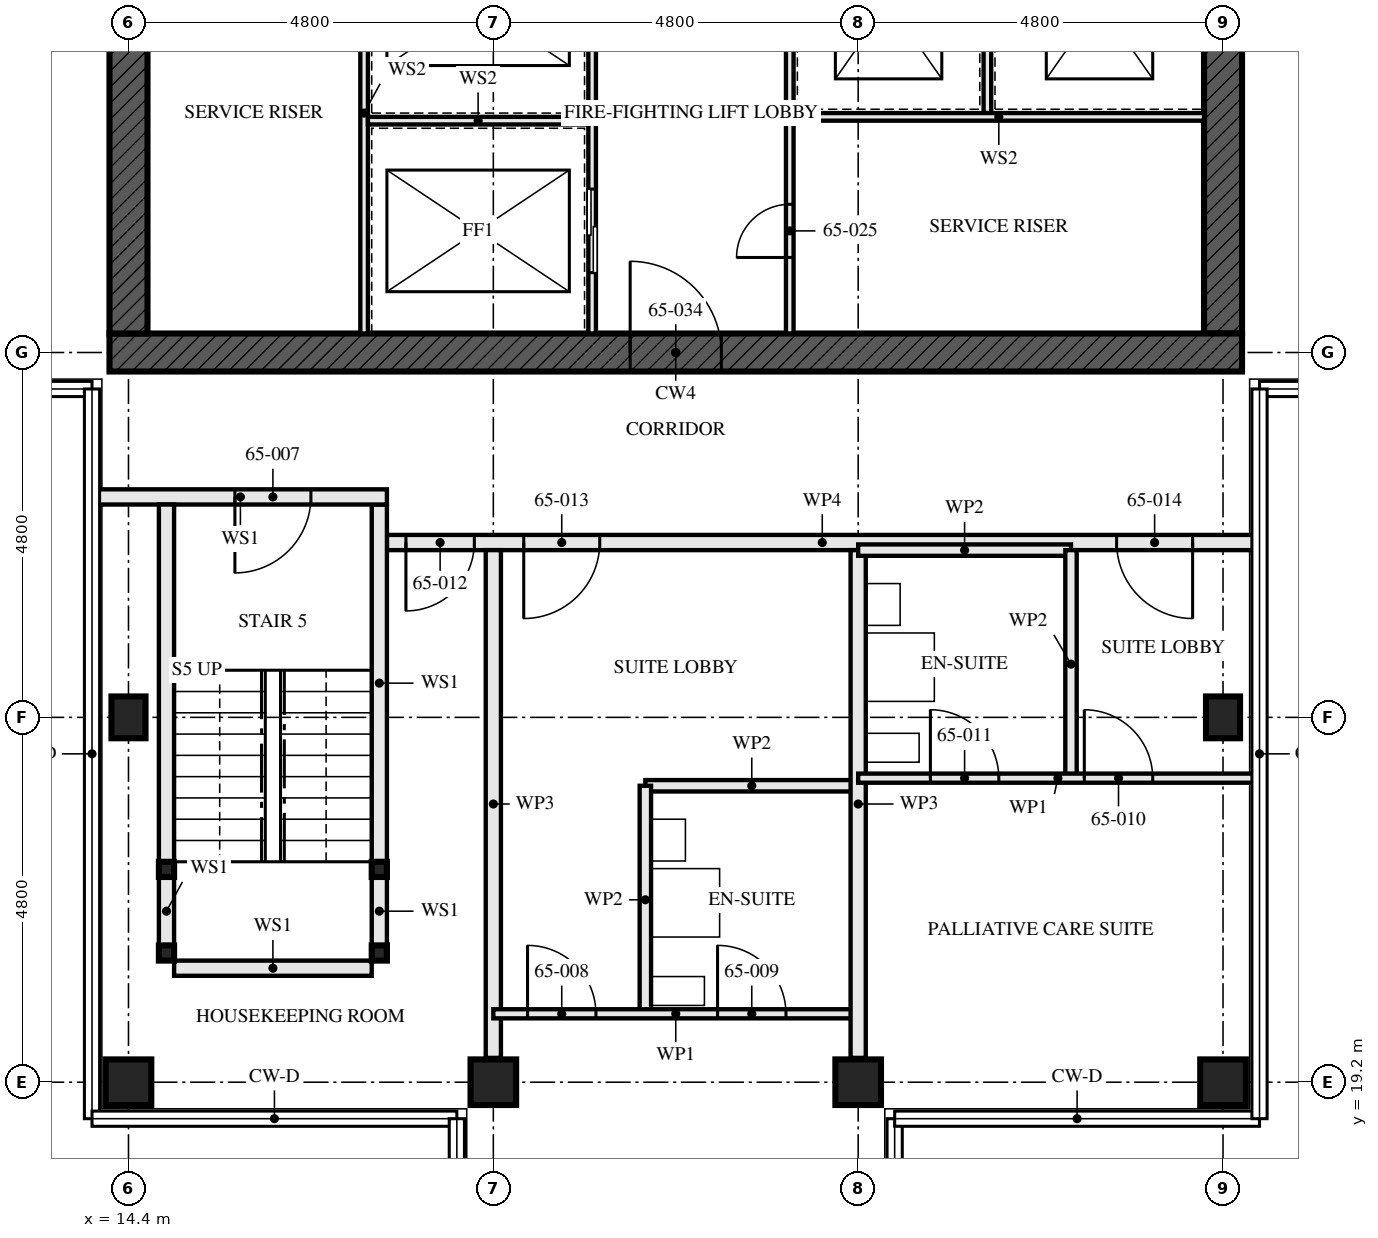
"""IFC4 building model, lengths in metres.
Left out: names, types, materials, properties, quantities, classifications, styles, units other than length and angle.
Written with IfcOpenShell. Run it as: python <this file> out.ifc"""

import sys

from ifc_helpers import new_model, si_unit, direction, frame, frame_2d, origin, origin_2d, place, context, subcontext, project, spatial, rectangle, hollow_rectangle, i_section, extrude, element, fill, save


model = new_model("IFC4")
c1 = context("Model", 3, precision=1e-05, world=origin(), true_north=direction((0.0, 1.0)))
c2 = subcontext(c1, "Body", "Model", "MODEL_VIEW")
j1 = project(units=[si_unit("LENGTHUNIT", "METRE"), si_unit("PLANEANGLEUNIT", "RADIAN")], contexts=[c1])
p1 = place(None, origin())
s1 = spatial("IfcSite", under=j1, at=p1, CompositionType="ELEMENT")
p2 = place(p1, origin())
s2 = spatial("IfcBuilding", under=s1, at=p2, CompositionType="ELEMENT")
p3 = place(p2, frame((0.0, 0.0, 236.5)))
s3 = spatial("IfcBuildingStorey", under=s2, at=p3, CompositionType="ELEMENT", Elevation=236.5)
p4 = place(p3, frame((14.4, 19.2, 0.0), z_axis=(0.0, 0.0, 1.0), x_axis=(0.0, 1.0, 0.0)))
e1 = element("IfcColumn", 1, at=p4, inside=s3, PredefinedType="COLUMN", context=c2, shape_type="SweptSolid", body=[
    extrude(hollow_rectangle(XDim=0.6, YDim=0.6, WallThickness=0.05, at=origin_2d()), origin(), (0.0, 0.0, 1.0), 3.5),
])
p5 = place(p3, frame((14.4, 24.0, 0.0), z_axis=(0.0, 0.0, 1.0), x_axis=(1.0, 0.0, 0.0)))
e2 = element("IfcColumn", 2, at=p5, inside=s3, PredefinedType="COLUMN", context=c2, shape_type="SweptSolid", body=[
    extrude(i_section(OverallWidth=0.448, OverallDepth=0.55, WebThickness=0.072, FlangeThickness=0.115, FilletRadius=0.015, at=origin_2d()), origin(), (0.0, 0.0, 1.0), 3.5),
])
for number, where, z_axis, x_axis in (
    (3, (19.2, 19.2, 0.0), (0.0, 0.0, 1.0), (0.0, 1.0, 0.0)),
    (4, (24.0, 19.2, 0.0), (0.0, 0.0, 1.0), (0.0, 1.0, 0.0)),
    (5, (28.8, 19.2, 0.0), (0.0, 0.0, 1.0), (0.0, 1.0, 0.0)),
):
    element("IfcColumn", number, at=place(p3, frame(where, z_axis=z_axis, x_axis=x_axis)), inside=s3, PredefinedType="COLUMN", context=c2, shape_type="SweptSolid", body=[
        extrude(hollow_rectangle(XDim=0.6, YDim=0.6, WallThickness=0.05, at=origin_2d()), origin(), (0.0, 0.0, 1.0), 3.5),
    ])
p6 = place(p3, frame((28.8, 24.0, 0.0), z_axis=(0.0, 0.0, 1.0), x_axis=(1.0, 0.0, 0.0)))
e6 = element("IfcColumn", 6, at=p6, inside=s3, PredefinedType="COLUMN", context=c2, shape_type="SweptSolid", body=[
    extrude(i_section(OverallWidth=0.448, OverallDepth=0.55, WebThickness=0.072, FlangeThickness=0.115, FilletRadius=0.015, at=origin_2d()), origin(), (0.0, 0.0, 1.0), 3.5),
])
p7 = place(p3, frame((14.15, 28.8, -0.17), z_axis=(0.0, 0.0, 1.0), x_axis=(1.0, 0.0, 0.0)))
e7 = element("IfcWall", 7, at=p7, inside=s3, PredefinedType="SHEAR", context=c2, shape_type="SweptSolid", body=[
    extrude(rectangle(XDim=14.9, YDim=0.5, at=frame_2d((7.45, 0.0))), origin(), (0.0, 0.0, 1.0), 3.5),
])
p8 = place(p7, frame((6.85, 0.0, 0.17)))
e8 = element("IfcOpeningElement", 8, at=p8, cuts=e7, PredefinedType="OPENING", context=c2, shape_type="SweptSolid", body=[
    extrude(rectangle(XDim=1.2, YDim=2.1, at=frame_2d((0.6, 1.05))), frame((0.0, 0.26, 0.0), z_axis=(0.0, -1.0, 0.0), x_axis=(1.0, 0.0, 0.0)), (0.0, 0.0, 1.0), 0.521),
])
p9 = place(p3, frame((14.4, 42.95, -0.17), z_axis=(0.0, 0.0, 1.0), x_axis=(0.0, -1.0, 0.0)))
e9 = element("IfcWall", 9, at=p9, inside=s3, PredefinedType="SHEAR", context=c2, shape_type="SweptSolid", body=[
    extrude(rectangle(XDim=13.9, YDim=0.5, at=frame_2d((6.95, 0.0))), origin(), (0.0, 0.0, 1.0), 3.5),
])
p10 = place(p9, frame((6.35, 0.0, 0.17)))
e10 = element("IfcOpeningElement", 10, at=p10, cuts=e9, PredefinedType="OPENING", context=c2, shape_type="SweptSolid", body=[
    extrude(rectangle(XDim=1.2, YDim=2.1, at=frame_2d((0.6, 1.05))), frame((0.0, 0.26, 0.0), z_axis=(0.0, -1.0, 0.0), x_axis=(1.0, 0.0, 0.0)), (0.0, 0.0, 1.0), 0.521),
])
p11 = place(p3, frame((28.8, 29.05, -0.17), z_axis=(0.0, 0.0, 1.0), x_axis=(0.0, 1.0, 0.0)))
e11 = element("IfcWall", 11, at=p11, inside=s3, PredefinedType="SHEAR", context=c2, shape_type="SweptSolid", body=[
    extrude(rectangle(XDim=13.9, YDim=0.5, at=frame_2d((6.95, 0.0))), origin(), (0.0, 0.0, 1.0), 3.5),
])
p12 = place(p11, frame((6.35, 0.0, 0.17)))
e12 = element("IfcOpeningElement", 12, at=p12, cuts=e11, PredefinedType="OPENING", context=c2, shape_type="SweptSolid", body=[
    extrude(rectangle(XDim=1.2, YDim=2.1, at=frame_2d((0.6, 1.05))), frame((0.0, 0.26, 0.0), z_axis=(0.0, -1.0, 0.0), x_axis=(1.0, 0.0, 0.0)), (0.0, 0.0, 1.0), 0.521),
])
for number, where, z_axis, x_axis in (
    (13, (14.9, 20.9, 0.0), (0.0, 0.0, 1.0), (1.0, 0.0, 0.0)),
    (14, (17.7, 20.9, 0.0), (0.0, 0.0, 1.0), (1.0, 0.0, 0.0)),
    (15, (14.9, 22.0, 0.0), (0.0, 0.0, 1.0), (1.0, 0.0, 0.0)),
    (16, (17.7, 22.0, 0.0), (0.0, 0.0, 1.0), (1.0, 0.0, 0.0)),
):
    element("IfcColumn", number, at=place(p3, frame(where, z_axis=z_axis, x_axis=x_axis)), inside=s3, PredefinedType="COLUMN", context=c2, shape_type="SweptSolid", body=[
        extrude(hollow_rectangle(XDim=0.2, YDim=0.2, WallThickness=0.008, at=origin_2d()), origin(), (0.0, 0.0, 1.0), 3.33),
    ])
p13 = place(p3, frame((14.9, 21.0, 0.0), z_axis=(0.0, 0.0, 1.0), x_axis=(0.0, 1.0, 0.0)))
e17 = element("IfcWall", 17, at=p13, inside=s3, PredefinedType="SOLIDWALL", context=c2, shape_type="SweptSolid", body=[
    extrude(rectangle(XDim=0.9, YDim=0.2, at=frame_2d((0.45, 0.0))), origin(), (0.0, 0.0, 1.0), 2.99),
])
p14 = place(p3, frame((14.9, 22.1, 0.0), z_axis=(0.0, 0.0, 1.0), x_axis=(0.0, 1.0, 0.0)))
e18 = element("IfcWall", 18, at=p14, inside=s3, PredefinedType="SOLIDWALL", context=c2, shape_type="SweptSolid", body=[
    extrude(rectangle(XDim=4.7, YDim=0.2, at=frame_2d((2.35, 0.0))), origin(), (0.0, 0.0, 1.0), 2.99),
])
p15 = place(p3, frame((17.7, 21.0, 0.0), z_axis=(0.0, 0.0, 1.0), x_axis=(0.0, 1.0, 0.0)))
e19 = element("IfcWall", 19, at=p15, inside=s3, PredefinedType="SOLIDWALL", context=c2, shape_type="SweptSolid", body=[
    extrude(rectangle(XDim=0.9, YDim=0.2, at=frame_2d((0.45, 0.0))), origin(), (0.0, 0.0, 1.0), 2.99),
])
p16 = place(p3, frame((17.7, 22.1, 0.0), z_axis=(0.0, 0.0, 1.0), x_axis=(0.0, 1.0, 0.0)))
e20 = element("IfcWall", 20, at=p16, inside=s3, PredefinedType="SOLIDWALL", context=c2, shape_type="SweptSolid", body=[
    extrude(rectangle(XDim=4.7, YDim=0.2, at=frame_2d((2.35, 0.0))), origin(), (0.0, 0.0, 1.0), 2.99),
])
p17 = place(p3, frame((15.0, 20.7, 0.0), z_axis=(0.0, 0.0, 1.0), x_axis=(1.0, 0.0, 0.0)))
e21 = element("IfcWall", 21, at=p17, inside=s3, PredefinedType="SOLIDWALL", context=c2, shape_type="SweptSolid", body=[
    extrude(rectangle(XDim=2.6, YDim=0.2, at=frame_2d((1.3, 0.0))), origin(), (0.0, 0.0, 1.0), 3.33),
])
p18 = place(p3, frame((13.945, 26.9, 0.0), z_axis=(0.0, 0.0, 1.0), x_axis=(1.0, 0.0, 0.0)))
e22 = element("IfcWall", 22, at=p18, inside=s3, PredefinedType="SOLIDWALL", context=c2, shape_type="SweptSolid", body=[
    extrude(rectangle(XDim=3.855, YDim=0.2, at=frame_2d((1.927, 0.0))), origin(), (0.0, 0.0, 1.0), 2.32),
])
p19 = place(p18, frame((1.855, 0.0, 0.0)))
e23 = element("IfcOpeningElement", 23, at=p19, cuts=e22, PredefinedType="OPENING", context=c2, shape_type="SweptSolid", body=[
    extrude(rectangle(XDim=1.0, YDim=2.1, at=frame_2d((0.5, 1.05))), frame((0.0, 0.111, 0.0), z_axis=(0.0, -1.0, 0.0), x_axis=(1.0, 0.0, 0.0)), (0.0, 0.0, 1.0), 0.221),
])
p20 = place(p3, frame((19.2, 19.52, 0.0), z_axis=(0.0, 0.0, 1.0), x_axis=(0.0, 1.0, 0.0)))
e24 = element("IfcWall", 24, at=p20, inside=s3, PredefinedType="PARTITIONING", context=c2, shape_type="SweptSolid", body=[
    extrude(rectangle(XDim=6.68, YDim=0.2, at=frame_2d((3.34, 0.0))), origin(), (0.0, 0.0, 1.0), 2.55),
])
p21 = place(p3, frame((21.2, 20.1, 0.0), z_axis=(0.0, 0.0, 1.0), x_axis=(0.0, 1.0, 0.0)))
e25 = element("IfcWall", 25, at=p21, inside=s3, PredefinedType="PARTITIONING", context=c2, shape_type="SweptSolid", body=[
    extrude(rectangle(XDim=3.0, YDim=0.15, at=frame_2d((1.5, 0.0))), origin(), (0.0, 0.0, 1.0), 3.33),
])
p22 = place(p3, frame((21.2, 23.1, 0.0), z_axis=(0.0, 0.0, 1.0), x_axis=(1.0, 0.0, 0.0)))
e26 = element("IfcWall", 26, at=p22, inside=s3, PredefinedType="PARTITIONING", context=c2, shape_type="SweptSolid", body=[
    extrude(rectangle(XDim=2.8, YDim=0.15, at=frame_2d((1.4, 0.0))), origin(), (0.0, 0.0, 1.0), 3.33),
])
p23 = place(p3, frame((19.2, 20.1, 0.0), z_axis=(0.0, 0.0, 1.0), x_axis=(1.0, 0.0, 0.0)))
e27 = element("IfcWall", 27, at=p23, inside=s3, PredefinedType="PARTITIONING", context=c2, shape_type="SweptSolid", body=[
    extrude(rectangle(XDim=4.8, YDim=0.12, at=frame_2d((2.4, 0.0))), origin(), (0.0, 0.0, 1.0), 3.33),
])
p24 = place(p23, frame((0.45, 0.0, 0.0)))
e28 = element("IfcOpeningElement", 28, at=p24, cuts=e27, PredefinedType="OPENING", context=c2, shape_type="SweptSolid", body=[
    extrude(rectangle(XDim=0.9, YDim=2.1, at=frame_2d((0.45, 1.05))), frame((0.0, 0.071, 0.0), z_axis=(0.0, -1.0, 0.0), x_axis=(1.0, 0.0, 0.0)), (0.0, 0.0, 1.0), 0.141),
])
p25 = place(p23, frame((2.95, 0.0, 0.0)))
e29 = element("IfcOpeningElement", 29, at=p25, cuts=e27, PredefinedType="OPENING", context=c2, shape_type="SweptSolid", body=[
    extrude(rectangle(XDim=0.9, YDim=2.1, at=frame_2d((0.45, 1.05))), frame((0.0, 0.071, 0.0), z_axis=(0.0, -1.0, 0.0), x_axis=(1.0, 0.0, 0.0)), (0.0, 0.0, 1.0), 0.141),
])
p26 = place(p3, frame((24.0, 19.52, 0.0), z_axis=(0.0, 0.0, 1.0), x_axis=(0.0, 1.0, 0.0)))
e30 = element("IfcWall", 30, at=p26, inside=s3, PredefinedType="PARTITIONING", context=c2, shape_type="SweptSolid", body=[
    extrude(rectangle(XDim=6.68, YDim=0.2, at=frame_2d((3.34, 0.0))), origin(), (0.0, 0.0, 1.0), 2.55),
])
p27 = place(p3, frame((26.8, 23.2, 0.0), z_axis=(0.0, 0.0, 1.0), x_axis=(0.0, 1.0, 0.0)))
e31 = element("IfcWall", 31, at=p27, inside=s3, PredefinedType="PARTITIONING", context=c2, shape_type="SweptSolid", body=[
    extrude(rectangle(XDim=3.0, YDim=0.15, at=frame_2d((1.5, 0.0))), origin(), (0.0, 0.0, 1.0), 2.55),
])
p28 = place(p3, frame((24.0, 26.2, 0.0), z_axis=(0.0, 0.0, 1.0), x_axis=(1.0, 0.0, 0.0)))
e32 = element("IfcWall", 32, at=p28, inside=s3, PredefinedType="PARTITIONING", context=c2, shape_type="SweptSolid", body=[
    extrude(rectangle(XDim=2.8, YDim=0.15, at=frame_2d((1.4, 0.0))), origin(), (0.0, 0.0, 1.0), 3.33),
])
p29 = place(p3, frame((24.0, 23.2, 0.0), z_axis=(0.0, 0.0, 1.0), x_axis=(1.0, 0.0, 0.0)))
e33 = element("IfcWall", 33, at=p29, inside=s3, PredefinedType="PARTITIONING", context=c2, shape_type="SweptSolid", body=[
    extrude(rectangle(XDim=5.255, YDim=0.12, at=frame_2d((2.627, 0.0))), origin(), (0.0, 0.0, 1.0), 2.32),
])
p30 = place(p29, frame((2.975, 0.0, 0.0)))
e34 = element("IfcOpeningElement", 34, at=p30, cuts=e33, PredefinedType="OPENING", context=c2, shape_type="SweptSolid", body=[
    extrude(rectangle(XDim=0.9, YDim=2.1, at=frame_2d((0.45, 1.05))), frame((0.0, 0.071, 0.0), z_axis=(0.0, -1.0, 0.0), x_axis=(1.0, 0.0, 0.0)), (0.0, 0.0, 1.0), 0.141),
])
p31 = place(p29, frame((0.95, 0.0, 0.0)))
e35 = element("IfcOpeningElement", 35, at=p31, cuts=e33, PredefinedType="OPENING", context=c2, shape_type="SweptSolid", body=[
    extrude(rectangle(XDim=0.9, YDim=2.1, at=frame_2d((0.45, 1.05))), frame((0.0, 0.071, 0.0), z_axis=(0.0, -1.0, 0.0), x_axis=(1.0, 0.0, 0.0)), (0.0, 0.0, 1.0), 0.141),
])
p32 = place(p3, frame((17.8, 26.3, 0.0), z_axis=(0.0, 0.0, 1.0), x_axis=(1.0, 0.0, 0.0)))
e36 = element("IfcWall", 36, at=p32, inside=s3, PredefinedType="PARTITIONING", context=c2, shape_type="SweptSolid", body=[
    extrude(rectangle(XDim=11.455, YDim=0.2, at=frame_2d((5.728, 0.0))), origin(), (0.0, 0.0, 1.0), 2.32),
])
p33 = place(p32, frame((0.25, 0.0, 0.0)))
e37 = element("IfcOpeningElement", 37, at=p33, cuts=e36, PredefinedType="OPENING", context=c2, shape_type="SweptSolid", body=[
    extrude(rectangle(XDim=0.9, YDim=2.1, at=frame_2d((0.45, 1.05))), frame((0.0, 0.111, 0.0), z_axis=(0.0, -1.0, 0.0), x_axis=(1.0, 0.0, 0.0)), (0.0, 0.0, 1.0), 0.221),
])
p34 = place(p32, frame((1.8, 0.0, 0.0)))
e38 = element("IfcOpeningElement", 38, at=p34, cuts=e36, PredefinedType="OPENING", context=c2, shape_type="SweptSolid", body=[
    extrude(rectangle(XDim=1.0, YDim=2.1, at=frame_2d((0.5, 1.05))), frame((0.0, 0.111, 0.0), z_axis=(0.0, -1.0, 0.0), x_axis=(1.0, 0.0, 0.0)), (0.0, 0.0, 1.0), 0.221),
])
p35 = place(p32, frame((9.6, 0.0, 0.0)))
e39 = element("IfcOpeningElement", 39, at=p35, cuts=e36, PredefinedType="OPENING", context=c2, shape_type="SweptSolid", body=[
    extrude(rectangle(XDim=1.0, YDim=2.1, at=frame_2d((0.5, 1.05))), frame((0.0, 0.111, 0.0), z_axis=(0.0, -1.0, 0.0), x_axis=(1.0, 0.0, 0.0)), (0.0, 0.0, 1.0), 0.221),
])
p36 = place(p3, frame((20.5, 29.05, 0.0), z_axis=(0.0, 0.0, 1.0), x_axis=(0.0, 1.0, 0.0)))
e40 = element("IfcWall", 40, at=p36, inside=s3, PredefinedType="SOLIDWALL", context=c2, shape_type="SweptSolid", body=[
    extrude(rectangle(XDim=5.8, YDim=0.1, at=frame_2d((2.9, 0.0))), origin(), (0.0, 0.0, 1.0), 3.33),
])
p37 = place(p36, frame((0.8, 0.0, 0.0)))
e41 = element("IfcOpeningElement", 41, at=p37, cuts=e40, PredefinedType="OPENING", context=c2, shape_type="SweptSolid", body=[
    extrude(rectangle(XDim=1.1, YDim=2.3, at=frame_2d((0.55, 1.15))), frame((0.0, 0.061, 0.0), z_axis=(0.0, -1.0, 0.0), x_axis=(1.0, 0.0, 0.0)), (0.0, 0.0, 1.0), 0.121),
])
p38 = place(p36, frame((3.775, 0.0, 0.0)))
e42 = element("IfcOpeningElement", 42, at=p38, cuts=e40, PredefinedType="OPENING", context=c2, shape_type="SweptSolid", body=[
    extrude(rectangle(XDim=1.1, YDim=2.3, at=frame_2d((0.55, 1.15))), frame((0.0, 0.061, 0.0), z_axis=(0.0, -1.0, 0.0), x_axis=(1.0, 0.0, 0.0)), (0.0, 0.0, 1.0), 0.121),
])
p39 = place(p3, frame((23.1, 29.05, 0.0), z_axis=(0.0, 0.0, 1.0), x_axis=(0.0, 1.0, 0.0)))
e43 = element("IfcWall", 43, at=p39, inside=s3, PredefinedType="SOLIDWALL", context=c2, shape_type="SweptSolid", body=[
    extrude(rectangle(XDim=5.8, YDim=0.1, at=frame_2d((2.9, 0.0))), origin(), (0.0, 0.0, 1.0), 3.33),
])
p40 = place(p39, frame((1.0, 0.0, 0.0)))
e44 = element("IfcOpeningElement", 44, at=p40, cuts=e43, PredefinedType="OPENING", context=c2, shape_type="SweptSolid", body=[
    extrude(rectangle(XDim=0.7, YDim=2.1, at=frame_2d((0.35, 1.05))), frame((0.0, 0.061, 0.0), z_axis=(0.0, -1.0, 0.0), x_axis=(1.0, 0.0, 0.0)), (0.0, 0.0, 1.0), 0.121),
])
p41 = place(p3, frame((17.5, 29.05, 0.0), z_axis=(0.0, 0.0, 1.0), x_axis=(0.0, 1.0, 0.0)))
e45 = element("IfcWall", 45, at=p41, inside=s3, PredefinedType="SOLIDWALL", context=c2, shape_type="SweptSolid", body=[
    extrude(rectangle(XDim=5.8, YDim=0.1, at=frame_2d((2.9, 0.0))), origin(), (0.0, 0.0, 1.0), 3.33),
])
p42 = place(p3, frame((17.55, 31.85, 0.0), z_axis=(0.0, 0.0, 1.0), x_axis=(1.0, 0.0, 0.0)))
e46 = element("IfcWall", 46, at=p42, inside=s3, PredefinedType="SOLIDWALL", context=c2, shape_type="SweptSolid", body=[
    extrude(rectangle(XDim=2.9, YDim=0.1, at=frame_2d((1.45, 0.0))), origin(), (0.0, 0.0, 1.0), 3.33),
])
p43 = place(p3, frame((25.7, 31.95, 0.0), z_axis=(0.0, 0.0, 1.0), x_axis=(0.0, 1.0, 0.0)))
e47 = element("IfcWall", 47, at=p43, inside=s3, PredefinedType="SOLIDWALL", context=c2, shape_type="SweptSolid", body=[
    extrude(rectangle(XDim=2.9, YDim=0.1, at=frame_2d((1.45, 0.0))), origin(), (0.0, 0.0, 1.0), 3.33),
])
p44 = place(p3, frame((23.15, 31.9, 0.0), z_axis=(0.0, 0.0, 1.0), x_axis=(1.0, 0.0, 0.0)))
e48 = element("IfcWall", 48, at=p44, inside=s3, PredefinedType="SOLIDWALL", context=c2, shape_type="SweptSolid", body=[
    extrude(rectangle(XDim=5.4, YDim=0.1, at=frame_2d((2.7, 0.0))), origin(), (0.0, 0.0, 1.0), 3.33),
])
p45 = place(p19, frame((1.0, 0.0, 0.0), z_axis=(0.0, 0.0, 1.0), x_axis=(-1.0, 0.0, 0.0)))
e49 = element("IfcDoor", 49, at=p45, inside=s3, OperationType="SINGLE_SWING_LEFT", PredefinedType="DOOR", context=c2, shape_type="SweptSolid", body=[
    extrude(rectangle(XDim=1.0, YDim=2.1, at=frame_2d((0.5, 1.05))), frame((0.0, 0.032, 0.0), z_axis=(0.0, -1.0, 0.0), x_axis=(1.0, 0.0, 0.0)), (0.0, 0.0, 1.0), 0.064),
])
fill(e23, e49)
p46 = place(p24, origin())
e50 = element("IfcDoor", 50, at=p46, inside=s3, OperationType="SINGLE_SWING_RIGHT", PredefinedType="DOOR", context=c2, shape_type="SweptSolid", body=[
    extrude(rectangle(XDim=0.9, YDim=2.1, at=frame_2d((0.45, 1.05))), frame((0.0, 0.022, 0.0), z_axis=(0.0, -1.0, 0.0), x_axis=(1.0, 0.0, 0.0)), (0.0, 0.0, 1.0), 0.044),
])
fill(e28, e50)
p47 = place(p25, origin())
e51 = element("IfcDoor", 51, at=p47, inside=s3, OperationType="SINGLE_SWING_RIGHT", PredefinedType="DOOR", context=c2, shape_type="SweptSolid", body=[
    extrude(rectangle(XDim=0.9, YDim=2.1, at=frame_2d((0.45, 1.05))), frame((0.0, 0.022, 0.0), z_axis=(0.0, -1.0, 0.0), x_axis=(1.0, 0.0, 0.0)), (0.0, 0.0, 1.0), 0.044),
])
fill(e29, e51)
p48 = place(p30, origin())
e52 = element("IfcDoor", 52, at=p48, inside=s3, OperationType="SINGLE_SWING_RIGHT", PredefinedType="DOOR", context=c2, shape_type="SweptSolid", body=[
    extrude(rectangle(XDim=0.9, YDim=2.1, at=frame_2d((0.45, 1.05))), frame((0.0, 0.022, 0.0), z_axis=(0.0, -1.0, 0.0), x_axis=(1.0, 0.0, 0.0)), (0.0, 0.0, 1.0), 0.044),
])
fill(e34, e52)
p49 = place(p31, origin())
e53 = element("IfcDoor", 53, at=p49, inside=s3, OperationType="SINGLE_SWING_RIGHT", PredefinedType="DOOR", context=c2, shape_type="SweptSolid", body=[
    extrude(rectangle(XDim=0.9, YDim=2.1, at=frame_2d((0.45, 1.05))), frame((0.0, 0.022, 0.0), z_axis=(0.0, -1.0, 0.0), x_axis=(1.0, 0.0, 0.0)), (0.0, 0.0, 1.0), 0.044),
])
fill(e35, e53)
p50 = place(p33, frame((0.9, 0.0, 0.0), z_axis=(0.0, 0.0, 1.0), x_axis=(-1.0, 0.0, 0.0)))
e54 = element("IfcDoor", 54, at=p50, inside=s3, OperationType="SINGLE_SWING_LEFT", PredefinedType="DOOR", context=c2, shape_type="SweptSolid", body=[
    extrude(rectangle(XDim=0.9, YDim=2.1, at=frame_2d((0.45, 1.05))), frame((0.0, 0.027, 0.0), z_axis=(0.0, -1.0, 0.0), x_axis=(1.0, 0.0, 0.0)), (0.0, 0.0, 1.0), 0.054),
])
fill(e37, e54)
p51 = place(p34, frame((1.0, 0.0, 0.0), z_axis=(0.0, 0.0, 1.0), x_axis=(-1.0, 0.0, 0.0)))
e55 = element("IfcDoor", 55, at=p51, inside=s3, OperationType="SINGLE_SWING_LEFT", PredefinedType="DOOR", context=c2, shape_type="SweptSolid", body=[
    extrude(rectangle(XDim=1.0, YDim=2.1, at=frame_2d((0.5, 1.05))), frame((0.0, 0.027, 0.0), z_axis=(0.0, -1.0, 0.0), x_axis=(1.0, 0.0, 0.0)), (0.0, 0.0, 1.0), 0.054),
])
fill(e38, e55)
p52 = place(p35, frame((1.0, 0.0, 0.0), z_axis=(0.0, 0.0, 1.0), x_axis=(-1.0, 0.0, 0.0)))
e56 = element("IfcDoor", 56, at=p52, inside=s3, OperationType="SINGLE_SWING_RIGHT", PredefinedType="DOOR", context=c2, shape_type="SweptSolid", body=[
    extrude(rectangle(XDim=1.0, YDim=2.1, at=frame_2d((0.5, 1.05))), frame((0.0, 0.027, 0.0), z_axis=(0.0, -1.0, 0.0), x_axis=(1.0, 0.0, 0.0)), (0.0, 0.0, 1.0), 0.054),
])
fill(e39, e56)
p53 = place(p37, origin())
e57 = element("IfcDoor", 57, at=p53, inside=s3, OperationType="SLIDING_TO_LEFT", PredefinedType="DOOR", context=c2, shape_type="SweptSolid", body=[
    extrude(rectangle(XDim=1.1, YDim=2.3, at=frame_2d((0.55, 1.15))), frame((0.0, 0.05, 0.0), z_axis=(0.0, -1.0, 0.0), x_axis=(1.0, 0.0, 0.0)), (0.0, 0.0, 1.0), 0.1),
])
fill(e41, e57)
p54 = place(p40, origin())
e58 = element("IfcDoor", 58, at=p54, inside=s3, OperationType="SINGLE_SWING_RIGHT", PredefinedType="DOOR", context=c2, shape_type="SweptSolid", body=[
    extrude(rectangle(XDim=0.7, YDim=2.1, at=frame_2d((0.35, 1.05))), frame((0.0, 0.027, 0.0), z_axis=(0.0, -1.0, 0.0), x_axis=(1.0, 0.0, 0.0)), (0.0, 0.0, 1.0), 0.054),
])
fill(e44, e58)
p55 = place(p8, origin())
e59 = element("IfcDoor", 59, at=p55, inside=s3, OperationType="SINGLE_SWING_LEFT", PredefinedType="DOOR", context=c2, shape_type="SweptSolid", body=[
    extrude(rectangle(XDim=1.2, YDim=2.1, at=frame_2d((0.6, 1.05))), frame((0.0, 0.027, 0.0), z_axis=(0.0, -1.0, 0.0), x_axis=(1.0, 0.0, 0.0)), (0.0, 0.0, 1.0), 0.054),
])
fill(e8, e59)
save(model, sys.argv[1])
